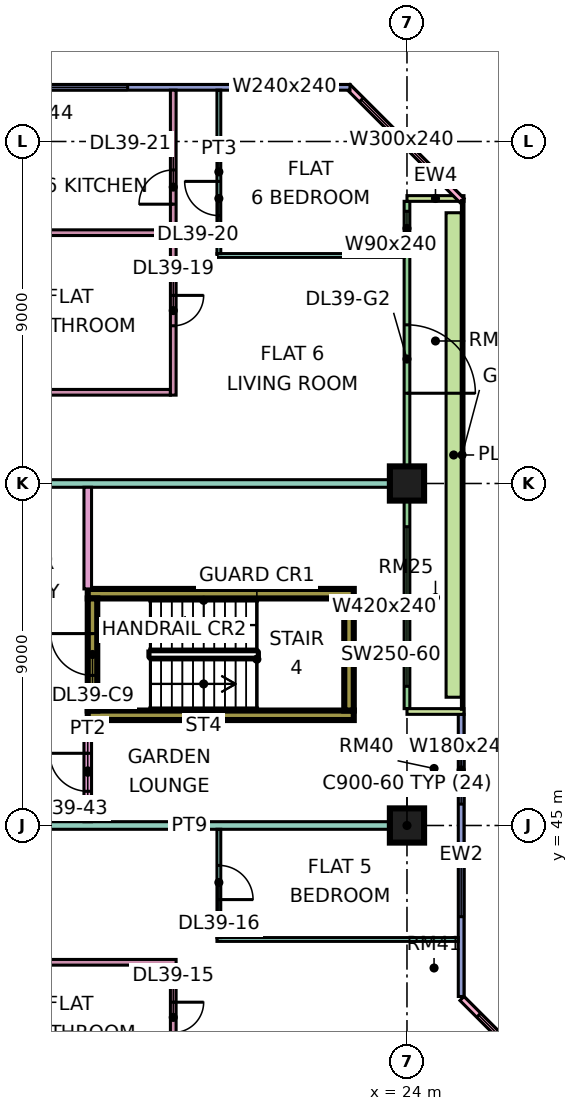
"""IFC4 building model, lengths in metres.
Left out: names, types, materials, properties, quantities, classifications, styles, units other than length and angle.
Written with IfcOpenShell. Run it as: python <this file> out.ifc"""

import sys

from ifc_helpers import new_model, si_unit, direction, frame, frame_2d, origin, origin_2d, place, context, subcontext, project, spatial, rectangle, extrude, element, fill, save


model = new_model("IFC4")
c1 = context("Model", 3, precision=1e-05, world=origin(), true_north=direction((0.0, 1.0)))
c2 = subcontext(c1, "Body", "Model", "MODEL_VIEW")
j1 = project(units=[si_unit("LENGTHUNIT", "METRE"), si_unit("PLANEANGLEUNIT", "RADIAN")], contexts=[c1])
p1 = place(None, origin())
s1 = spatial("IfcSite", under=j1, at=p1, CompositionType="ELEMENT")
p2 = place(p1, origin())
s2 = spatial("IfcBuilding", under=s1, at=p2, CompositionType="ELEMENT")
p3 = place(p2, frame((0.0, 0.0, 172.4)))
s3 = spatial("IfcBuildingStorey", under=s2, at=p3, CompositionType="ELEMENT", Elevation=172.4)
for number, where, z_axis, x_axis in (
    (1, (24.0, 45.0, 0.0), (0.0, 0.0, 1.0), (1.0, 0.0, 0.0)),
    (2, (24.0, 54.0, 0.0), (0.0, 0.0, 1.0), (1.0, 0.0, 0.0)),
):
    element("IfcColumn", number, at=place(p3, frame(where, z_axis=z_axis, x_axis=x_axis)), inside=s3, PredefinedType="COLUMN", context=c2, shape_type="SweptSolid", body=[
        extrude(rectangle(XDim=0.9, YDim=0.9, at=origin_2d()), origin(), (0.0, 0.0, 1.0), 3.75),
    ])
for number, where, z_axis, x_axis in (
    (3, (15.6, 47.9, 0.0), (0.0, 0.0, 1.0), (1.0, 0.0, 0.0)),
    (4, (15.6, 51.1, 0.0), (0.0, 0.0, 1.0), (1.0, 0.0, 0.0)),
):
    element("IfcWall", number, at=place(p3, frame(where, z_axis=z_axis, x_axis=x_axis)), inside=s3, PredefinedType="SHEAR", context=c2, shape_type="SweptSolid", body=[
        extrude(rectangle(XDim=7.0, YDim=0.25, at=frame_2d((3.5, 0.0))), origin(), (0.0, 0.0, 1.0), 3.75),
    ])
p4 = place(p3, frame((15.725, 48.025, 0.0), z_axis=(0.0, 0.0, 1.0), x_axis=(0.0, 1.0, 0.0)))
e5 = element("IfcWall", 5, at=p4, inside=s3, PredefinedType="SHEAR", context=c2, shape_type="SweptSolid", body=[
    extrude(rectangle(XDim=2.95, YDim=0.25, at=frame_2d((1.475, 0.0))), origin(), (0.0, 0.0, 1.0), 3.75),
])
p5 = place(p4, frame((0.925, 0.0, 0.0)))
e6 = element("IfcOpeningElement", 6, at=p5, cuts=e5, PredefinedType="OPENING", context=c2, shape_type="SweptSolid", body=[
    extrude(rectangle(XDim=1.1, YDim=2.2, at=frame_2d((0.55, 1.1))), frame((0.0, 0.135, 0.0), z_axis=(0.0, -1.0, 0.0), x_axis=(1.0, 0.0, 0.0)), (0.0, 0.0, 1.0), 0.27),
])
p6 = place(p3, frame((22.475, 48.025, 0.0), z_axis=(0.0, 0.0, 1.0), x_axis=(0.0, 1.0, 0.0)))
e7 = element("IfcWall", 7, at=p6, inside=s3, PredefinedType="SHEAR", context=c2, shape_type="SweptSolid", body=[
    extrude(rectangle(XDim=2.95, YDim=0.25, at=frame_2d((1.475, 0.0))), origin(), (0.0, 0.0, 1.0), 3.75),
])
p7 = place(p3, frame((28.447, 37.447, 0.0), z_axis=(0.0, 0.0, 1.0), x_axis=(-0.707106781187, 0.707106781187, 0.0)))
e8 = element("IfcWall", 8, at=p7, inside=s3, PredefinedType="SOLIDWALL", context=c2, shape_type="SweptSolid", body=[
    extrude(rectangle(XDim=4.243, YDim=0.15, at=frame_2d((2.121, 0.0))), origin(), (0.0, 0.0, 1.0), 3.35),
])
p8 = place(p7, frame((0.621, 0.0, 0.45)))
e9 = element("IfcOpeningElement", 9, at=p8, cuts=e8, PredefinedType="OPENING", context=c2, shape_type="SweptSolid", body=[
    extrude(rectangle(XDim=3.0, YDim=2.4, at=frame_2d((1.5, 1.2))), frame((0.0, 0.085, 0.0), z_axis=(0.0, -1.0, 0.0), x_axis=(1.0, 0.0, 0.0)), (0.0, 0.0, 1.0), 0.17),
])
p9 = place(p3, frame((25.425, 40.5, 0.0), z_axis=(0.0, 0.0, 1.0), x_axis=(0.0, 1.0, 0.0)))
e10 = element("IfcWall", 10, at=p9, inside=s3, PredefinedType="SOLIDWALL", context=c2, shape_type="SweptSolid", body=[
    extrude(rectangle(XDim=7.425, YDim=0.15, at=frame_2d((3.712, 0.0))), origin(), (0.0, 0.0, 1.0), 3.35),
])
p10 = place(p9, frame((2.1, 0.0, 0.45)))
e11 = element("IfcOpeningElement", 11, at=p10, cuts=e10, PredefinedType="OPENING", context=c2, shape_type="SweptSolid", body=[
    extrude(rectangle(XDim=1.8, YDim=2.4, at=frame_2d((0.9, 1.2))), frame((0.0, 0.085, 0.0), z_axis=(0.0, -1.0, 0.0), x_axis=(1.0, 0.0, 0.0)), (0.0, 0.0, 1.0), 0.17),
])
p11 = place(p9, frame((5.062, 0.0, 0.45)))
e12 = element("IfcOpeningElement", 12, at=p11, cuts=e10, PredefinedType="OPENING", context=c2, shape_type="SweptSolid", body=[
    extrude(rectangle(XDim=1.8, YDim=2.4, at=frame_2d((0.9, 1.2))), frame((0.0, 0.085, 0.0), z_axis=(0.0, -1.0, 0.0), x_axis=(1.0, 0.0, 0.0)), (0.0, 0.0, 1.0), 0.17),
])
p12 = place(p3, frame((24.0, 48.075, 0.0), z_axis=(0.0, 0.0, 1.0), x_axis=(0.0, 1.0, 0.0)))
e13 = element("IfcWall", 13, at=p12, inside=s3, PredefinedType="SOLIDWALL", context=c2, shape_type="SweptSolid", body=[
    extrude(rectangle(XDim=13.35, YDim=0.15, at=frame_2d((6.675, 0.0))), origin(), (0.0, 0.0, 1.0), 3.35),
])
p13 = place(p12, frame((0.587, 0.0, 0.45)))
e14 = element("IfcOpeningElement", 14, at=p13, cuts=e13, PredefinedType="OPENING", context=c2, shape_type="SweptSolid", body=[
    extrude(rectangle(XDim=4.2, YDim=2.4, at=frame_2d((2.1, 1.2))), frame((0.0, 0.085, 0.0), z_axis=(0.0, -1.0, 0.0), x_axis=(1.0, 0.0, 0.0)), (0.0, 0.0, 1.0), 0.17),
])
p14 = place(p12, frame((8.3, 0.0, 0.0)))
e15 = element("IfcOpeningElement", 15, at=p14, cuts=e13, PredefinedType="OPENING", context=c2, shape_type="SweptSolid", body=[
    extrude(rectangle(XDim=1.8, YDim=2.4, at=frame_2d((0.9, 1.2))), frame((0.0, 0.085, 0.0), z_axis=(0.0, -1.0, 0.0), x_axis=(1.0, 0.0, 0.0)), (0.0, 0.0, 1.0), 0.17),
])
p15 = place(p12, frame((12.188, 0.0, 0.45)))
e16 = element("IfcOpeningElement", 16, at=p15, cuts=e13, PredefinedType="OPENING", context=c2, shape_type="SweptSolid", body=[
    extrude(rectangle(XDim=0.9, YDim=2.4, at=frame_2d((0.45, 1.2))), frame((0.0, 0.085, 0.0), z_axis=(0.0, -1.0, 0.0), x_axis=(1.0, 0.0, 0.0)), (0.0, 0.0, 1.0), 0.17),
])
for number, where, z_axis, x_axis in (
    (17, (25.5, 48.0, 0.0), (0.0, 0.0, 1.0), (-1.0, 0.0, 0.0)),
    (18, (25.5, 61.5, 0.0), (0.0, 0.0, 1.0), (-1.0, 0.0, 0.0)),
):
    element("IfcWall", number, at=place(p3, frame(where, z_axis=z_axis, x_axis=x_axis)), inside=s3, PredefinedType="SOLIDWALL", context=c2, shape_type="SweptSolid", body=[
        extrude(rectangle(XDim=1.5, YDim=0.15, at=frame_2d((0.75, 0.0))), origin(), (0.0, 0.0, 1.0), 3.35),
    ])
p16 = place(p3, frame((25.447, 61.447, 0.0), z_axis=(0.0, 0.0, 1.0), x_axis=(-0.707106781187, 0.707106781187, 0.0)))
e19 = element("IfcWall", 19, at=p16, inside=s3, PredefinedType="SOLIDWALL", context=c2, shape_type="SweptSolid", body=[
    extrude(rectangle(XDim=4.243, YDim=0.15, at=frame_2d((2.121, 0.0))), origin(), (0.0, 0.0, 1.0), 3.35),
])
p17 = place(p16, frame((0.744, 0.0, 0.45)))
e20 = element("IfcOpeningElement", 20, at=p17, cuts=e19, PredefinedType="OPENING", context=c2, shape_type="SweptSolid", body=[
    extrude(rectangle(XDim=3.0, YDim=2.4, at=frame_2d((1.5, 1.2))), frame((0.0, 0.085, 0.0), z_axis=(0.0, -1.0, 0.0), x_axis=(1.0, 0.0, 0.0)), (0.0, 0.0, 1.0), 0.17),
])
p18 = place(p3, frame((22.5, 64.425, 0.0), z_axis=(0.0, 0.0, 1.0), x_axis=(-1.0, 0.0, 0.0)))
e21 = element("IfcWall", 21, at=p18, inside=s3, PredefinedType="SOLIDWALL", context=c2, shape_type="SweptSolid", body=[
    extrude(rectangle(XDim=10.425, YDim=0.15, at=frame_2d((5.212, 0.0))), origin(), (0.0, 0.0, 1.0), 3.35),
])
p19 = place(p18, frame((0.525, 0.0, 0.45)))
e22 = element("IfcOpeningElement", 22, at=p19, cuts=e21, PredefinedType="OPENING", context=c2, shape_type="SweptSolid", body=[
    extrude(rectangle(XDim=2.4, YDim=2.4, at=frame_2d((1.2, 1.2))), frame((0.0, 0.085, 0.0), z_axis=(0.0, -1.0, 0.0), x_axis=(1.0, 0.0, 0.0)), (0.0, 0.0, 1.0), 0.17),
])
p20 = place(p18, frame((5.85, 0.0, 0.45)))
e23 = element("IfcOpeningElement", 23, at=p20, cuts=e21, PredefinedType="OPENING", context=c2, shape_type="SweptSolid", body=[
    extrude(rectangle(XDim=3.0, YDim=2.4, at=frame_2d((1.5, 1.2))), frame((0.0, 0.085, 0.0), z_axis=(0.0, -1.0, 0.0), x_axis=(1.0, 0.0, 0.0)), (0.0, 0.0, 1.0), 0.17),
])
p21 = place(p3, frame((25.229, 48.375, 0.0), z_axis=(0.0, 0.0, 1.0), x_axis=(0.0, 1.0, 0.0)))
e24 = element("IfcWall", 24, at=p21, inside=s3, PredefinedType="SOLIDWALL", context=c2, shape_type="SweptSolid", body=[
    extrude(rectangle(XDim=12.75, YDim=0.4, at=frame_2d((6.375, 0.0))), origin(), (0.0, 0.0, 1.0), 0.7),
])
p22 = place(p3, frame((12.55, 41.4, 0.0), z_axis=(0.0, 0.0, 1.0), x_axis=(1.0, 0.0, 0.0)))
e25 = element("IfcWall", 25, at=p22, inside=s3, PredefinedType="PARTITIONING", context=c2, shape_type="SweptSolid", body=[
    extrude(rectangle(XDim=5.375, YDim=0.15, at=frame_2d((2.688, 0.0))), origin(), (0.0, 0.0, 1.0), 3.35),
])
p23 = place(p3, frame((12.55, 45.0, 0.0), z_axis=(0.0, 0.0, 1.0), x_axis=(1.0, 0.0, 0.0)))
e26 = element("IfcWall", 26, at=p23, inside=s3, PredefinedType="PARTITIONING", context=c2, shape_type="SweptSolid", body=[
    extrude(rectangle(XDim=11.45, YDim=0.2, at=frame_2d((5.725, 0.0))), origin(), (0.0, 0.0, 1.0), 3.35),
])
p24 = place(p3, frame((12.55, 54.0, 0.0), z_axis=(0.0, 0.0, 1.0), x_axis=(1.0, 0.0, 0.0)))
e27 = element("IfcWall", 27, at=p24, inside=s3, PredefinedType="PARTITIONING", context=c2, shape_type="SweptSolid", body=[
    extrude(rectangle(XDim=11.376, YDim=0.2, at=frame_2d((5.688, 0.0))), origin(), (0.0, 0.0, 1.0), 3.35),
])
for number, where, z_axis, x_axis in (
    (28, (12.55, 56.4, 0.0), (0.0, 0.0, 1.0), (1.0, 0.0, 0.0)),
    (29, (12.55, 60.6, 0.0), (0.0, 0.0, 1.0), (1.0, 0.0, 0.0)),
):
    element("IfcWall", number, at=place(p3, frame(where, z_axis=z_axis, x_axis=x_axis)), inside=s3, PredefinedType="PARTITIONING", context=c2, shape_type="SweptSolid", body=[
        extrude(rectangle(XDim=5.225, YDim=0.15, at=frame_2d((2.612, 0.0))), origin(), (0.0, 0.0, 1.0), 3.35),
    ])
p25 = place(p3, frame((15.6, 45.1, 0.0), z_axis=(0.0, 0.0, 1.0), x_axis=(0.0, 1.0, 0.0)))
e30 = element("IfcWall", 30, at=p25, inside=s3, PredefinedType="PARTITIONING", context=c2, shape_type="SweptSolid", body=[
    extrude(rectangle(XDim=2.675, YDim=0.2, at=frame_2d((1.337, 0.0))), origin(), (0.0, 0.0, 1.0), 3.35),
])
p26 = place(p25, frame((0.8, 0.0, 0.0)))
e31 = element("IfcOpeningElement", 31, at=p26, cuts=e30, PredefinedType="OPENING", context=c2, shape_type="SweptSolid", body=[
    extrude(rectangle(XDim=1.0, YDim=2.1, at=frame_2d((0.5, 1.05))), frame((0.0, 0.11, 0.0), z_axis=(0.0, -1.0, 0.0), x_axis=(1.0, 0.0, 0.0)), (0.0, 0.0, 1.0), 0.22),
])
p27 = place(p3, frame((15.6, 51.225, 0.0), z_axis=(0.0, 0.0, 1.0), x_axis=(0.0, 1.0, 0.0)))
e32 = element("IfcWall", 32, at=p27, inside=s3, PredefinedType="PARTITIONING", context=c2, shape_type="SweptSolid", body=[
    extrude(rectangle(XDim=2.675, YDim=0.2, at=frame_2d((1.337, 0.0))), origin(), (0.0, 0.0, 1.0), 3.35),
])
p28 = place(p3, frame((17.85, 36.1, 0.0), z_axis=(0.0, 0.0, 1.0), x_axis=(0.0, 1.0, 0.0)))
e33 = element("IfcWall", 33, at=p28, inside=s3, PredefinedType="PARTITIONING", context=c2, shape_type="SweptSolid", body=[
    extrude(rectangle(XDim=5.225, YDim=0.15, at=frame_2d((2.612, 0.0))), origin(), (0.0, 0.0, 1.0), 3.35),
])
p29 = place(p28, frame((3.45, 0.0, 0.0)))
e34 = element("IfcOpeningElement", 34, at=p29, cuts=e33, PredefinedType="OPENING", context=c2, shape_type="SweptSolid", body=[
    extrude(rectangle(XDim=0.8, YDim=2.1, at=frame_2d((0.4, 1.05))), frame((0.0, 0.085, 0.0), z_axis=(0.0, -1.0, 0.0), x_axis=(1.0, 0.0, 0.0)), (0.0, 0.0, 1.0), 0.17),
])
p30 = place(p28, frame((0.65, 0.0, 0.0)))
e35 = element("IfcOpeningElement", 35, at=p30, cuts=e33, PredefinedType="OPENING", context=c2, shape_type="SweptSolid", body=[
    extrude(rectangle(XDim=0.9, YDim=2.1, at=frame_2d((0.45, 1.05))), frame((0.0, 0.085, 0.0), z_axis=(0.0, -1.0, 0.0), x_axis=(1.0, 0.0, 0.0)), (0.0, 0.0, 1.0), 0.17),
])
p31 = place(p3, frame((17.85, 56.325, 0.0), z_axis=(0.0, 0.0, 1.0), x_axis=(0.0, 1.0, 0.0)))
e36 = element("IfcWall", 36, at=p31, inside=s3, PredefinedType="PARTITIONING", context=c2, shape_type="SweptSolid", body=[
    extrude(rectangle(XDim=8.025, YDim=0.15, at=frame_2d((4.013, 0.0))), origin(), (0.0, 0.0, 1.0), 3.35),
])
p32 = place(p31, frame((1.825, 0.0, 0.0)))
e37 = element("IfcOpeningElement", 37, at=p32, cuts=e36, PredefinedType="OPENING", context=c2, shape_type="SweptSolid", body=[
    extrude(rectangle(XDim=0.8, YDim=2.1, at=frame_2d((0.4, 1.05))), frame((0.0, 0.085, 0.0), z_axis=(0.0, -1.0, 0.0), x_axis=(1.0, 0.0, 0.0)), (0.0, 0.0, 1.0), 0.17),
])
p33 = place(p31, frame((5.025, 0.0, 0.0)))
e38 = element("IfcOpeningElement", 38, at=p33, cuts=e36, PredefinedType="OPENING", context=c2, shape_type="SweptSolid", body=[
    extrude(rectangle(XDim=0.9, YDim=2.1, at=frame_2d((0.45, 1.05))), frame((0.0, 0.085, 0.0), z_axis=(0.0, -1.0, 0.0), x_axis=(1.0, 0.0, 0.0)), (0.0, 0.0, 1.0), 0.17),
])
p34 = place(p3, frame((19.0, 42.0, 0.0), z_axis=(0.0, 0.0, 1.0), x_axis=(1.0, 0.0, 0.0)))
e39 = element("IfcWall", 39, at=p34, inside=s3, PredefinedType="PARTITIONING", context=c2, shape_type="SweptSolid", body=[
    extrude(rectangle(XDim=6.35, YDim=0.1, at=frame_2d((3.175, 0.0))), origin(), (0.0, 0.0, 1.0), 3.35),
])
p35 = place(p3, frame((19.0, 60.0, 0.0), z_axis=(0.0, 0.0, 1.0), x_axis=(1.0, 0.0, 0.0)))
e40 = element("IfcWall", 40, at=p35, inside=s3, PredefinedType="PARTITIONING", context=c2, shape_type="SweptSolid", body=[
    extrude(rectangle(XDim=4.926, YDim=0.1, at=frame_2d((2.463, 0.0))), origin(), (0.0, 0.0, 1.0), 3.35),
])
p36 = place(p3, frame((19.05, 42.05, 0.0), z_axis=(0.0, 0.0, 1.0), x_axis=(0.0, 1.0, 0.0)))
e41 = element("IfcWall", 41, at=p36, inside=s3, PredefinedType="PARTITIONING", context=c2, shape_type="SweptSolid", body=[
    extrude(rectangle(XDim=2.85, YDim=0.1, at=frame_2d((1.425, 0.0))), origin(), (0.0, 0.0, 1.0), 3.35),
])
p37 = place(p36, frame((1.0, 0.0, 0.0)))
e42 = element("IfcOpeningElement", 42, at=p37, cuts=e41, PredefinedType="OPENING", context=c2, shape_type="SweptSolid", body=[
    extrude(rectangle(XDim=0.9, YDim=2.1, at=frame_2d((0.45, 1.05))), frame((0.0, 0.06, 0.0), z_axis=(0.0, -1.0, 0.0), x_axis=(1.0, 0.0, 0.0)), (0.0, 0.0, 1.0), 0.12),
])
p38 = place(p3, frame((19.05, 60.05, 0.0), z_axis=(0.0, 0.0, 1.0), x_axis=(0.0, 1.0, 0.0)))
e43 = element("IfcWall", 43, at=p38, inside=s3, PredefinedType="PARTITIONING", context=c2, shape_type="SweptSolid", body=[
    extrude(rectangle(XDim=4.301, YDim=0.1, at=frame_2d((2.15, 0.0))), origin(), (0.0, 0.0, 1.0), 3.35),
])
p39 = place(p38, frame((1.0, 0.0, 0.0)))
e44 = element("IfcOpeningElement", 44, at=p39, cuts=e43, PredefinedType="OPENING", context=c2, shape_type="SweptSolid", body=[
    extrude(rectangle(XDim=0.9, YDim=2.1, at=frame_2d((0.45, 1.05))), frame((0.0, 0.06, 0.0), z_axis=(0.0, -1.0, 0.0), x_axis=(1.0, 0.0, 0.0)), (0.0, 0.0, 1.0), 0.12),
])
p40 = place(p8, origin())
e45 = element("IfcWindow", 45, at=p40, inside=s3, PartitioningType="SINGLE_PANEL", PredefinedType="WINDOW", context=c2, shape_type="SweptSolid", body=[
    extrude(rectangle(XDim=3.0, YDim=2.4, at=frame_2d((1.5, 1.2))), frame((0.0, 0.03, 0.0), z_axis=(0.0, -1.0, 0.0), x_axis=(1.0, 0.0, 0.0)), (0.0, 0.0, 1.0), 0.06),
])
fill(e9, e45)
p41 = place(p10, origin())
e46 = element("IfcWindow", 46, at=p41, inside=s3, PartitioningType="SINGLE_PANEL", PredefinedType="WINDOW", context=c2, shape_type="SweptSolid", body=[
    extrude(rectangle(XDim=1.8, YDim=2.4, at=frame_2d((0.9, 1.2))), frame((0.0, 0.03, 0.0), z_axis=(0.0, -1.0, 0.0), x_axis=(1.0, 0.0, 0.0)), (0.0, 0.0, 1.0), 0.06),
])
fill(e11, e46)
p42 = place(p11, origin())
e47 = element("IfcWindow", 47, at=p42, inside=s3, PartitioningType="SINGLE_PANEL", PredefinedType="WINDOW", context=c2, shape_type="SweptSolid", body=[
    extrude(rectangle(XDim=1.8, YDim=2.4, at=frame_2d((0.9, 1.2))), frame((0.0, 0.03, 0.0), z_axis=(0.0, -1.0, 0.0), x_axis=(1.0, 0.0, 0.0)), (0.0, 0.0, 1.0), 0.06),
])
fill(e12, e47)
p43 = place(p13, origin())
e48 = element("IfcWindow", 48, at=p43, inside=s3, PartitioningType="SINGLE_PANEL", PredefinedType="WINDOW", context=c2, shape_type="SweptSolid", body=[
    extrude(rectangle(XDim=4.2, YDim=2.4, at=frame_2d((2.1, 1.2))), frame((0.0, 0.03, 0.0), z_axis=(0.0, -1.0, 0.0), x_axis=(1.0, 0.0, 0.0)), (0.0, 0.0, 1.0), 0.06),
])
fill(e14, e48)
p44 = place(p14, frame((1.8, 0.0, 0.0), z_axis=(0.0, 0.0, 1.0), x_axis=(-1.0, 0.0, 0.0)))
e49 = element("IfcDoor", 49, at=p44, inside=s3, OperationType="DOUBLE_DOOR_SINGLE_SWING", PredefinedType="DOOR", context=c2, shape_type="SweptSolid", body=[
    extrude(rectangle(XDim=1.8, YDim=2.4, at=frame_2d((0.9, 1.2))), frame((0.0, 0.025, 0.0), z_axis=(0.0, -1.0, 0.0), x_axis=(1.0, 0.0, 0.0)), (0.0, 0.0, 1.0), 0.05),
])
fill(e15, e49)
p45 = place(p15, origin())
e50 = element("IfcWindow", 50, at=p45, inside=s3, PartitioningType="SINGLE_PANEL", PredefinedType="WINDOW", context=c2, shape_type="SweptSolid", body=[
    extrude(rectangle(XDim=0.9, YDim=2.4, at=frame_2d((0.45, 1.2))), frame((0.0, 0.03, 0.0), z_axis=(0.0, -1.0, 0.0), x_axis=(1.0, 0.0, 0.0)), (0.0, 0.0, 1.0), 0.06),
])
fill(e16, e50)
p46 = place(p17, origin())
e51 = element("IfcWindow", 51, at=p46, inside=s3, PartitioningType="SINGLE_PANEL", PredefinedType="WINDOW", context=c2, shape_type="SweptSolid", body=[
    extrude(rectangle(XDim=3.0, YDim=2.4, at=frame_2d((1.5, 1.2))), frame((0.0, 0.03, 0.0), z_axis=(0.0, -1.0, 0.0), x_axis=(1.0, 0.0, 0.0)), (0.0, 0.0, 1.0), 0.06),
])
fill(e20, e51)
p47 = place(p19, origin())
e52 = element("IfcWindow", 52, at=p47, inside=s3, PartitioningType="SINGLE_PANEL", PredefinedType="WINDOW", context=c2, shape_type="SweptSolid", body=[
    extrude(rectangle(XDim=2.4, YDim=2.4, at=frame_2d((1.2, 1.2))), frame((0.0, 0.03, 0.0), z_axis=(0.0, -1.0, 0.0), x_axis=(1.0, 0.0, 0.0)), (0.0, 0.0, 1.0), 0.06),
])
fill(e22, e52)
p48 = place(p20, origin())
e53 = element("IfcWindow", 53, at=p48, inside=s3, PartitioningType="SINGLE_PANEL", PredefinedType="WINDOW", context=c2, shape_type="SweptSolid", body=[
    extrude(rectangle(XDim=3.0, YDim=2.4, at=frame_2d((1.5, 1.2))), frame((0.0, 0.03, 0.0), z_axis=(0.0, -1.0, 0.0), x_axis=(1.0, 0.0, 0.0)), (0.0, 0.0, 1.0), 0.06),
])
fill(e23, e53)
p49 = place(p5, frame((1.1, 0.0, 0.0), z_axis=(0.0, 0.0, 1.0), x_axis=(-1.0, 0.0, 0.0)))
e54 = element("IfcDoor", 54, at=p49, inside=s3, OperationType="SINGLE_SWING_RIGHT", PredefinedType="DOOR", context=c2, shape_type="SweptSolid", body=[
    extrude(rectangle(XDim=1.1, YDim=2.2, at=frame_2d((0.55, 1.1))), frame((0.0, 0.025, 0.0), z_axis=(0.0, -1.0, 0.0), x_axis=(1.0, 0.0, 0.0)), (0.0, 0.0, 1.0), 0.05),
])
fill(e6, e54)
p50 = place(p29, origin())
e55 = element("IfcDoor", 55, at=p50, inside=s3, OperationType="SINGLE_SWING_RIGHT", PredefinedType="DOOR", context=c2, shape_type="SweptSolid", body=[
    extrude(rectangle(XDim=0.8, YDim=2.1, at=frame_2d((0.4, 1.05))), frame((0.0, 0.025, 0.0), z_axis=(0.0, -1.0, 0.0), x_axis=(1.0, 0.0, 0.0)), (0.0, 0.0, 1.0), 0.05),
])
fill(e34, e55)
p51 = place(p37, frame((0.9, 0.0, 0.0), z_axis=(0.0, 0.0, 1.0), x_axis=(-1.0, 0.0, 0.0)))
e56 = element("IfcDoor", 56, at=p51, inside=s3, OperationType="SINGLE_SWING_LEFT", PredefinedType="DOOR", context=c2, shape_type="SweptSolid", body=[
    extrude(rectangle(XDim=0.9, YDim=2.1, at=frame_2d((0.45, 1.05))), frame((0.0, 0.025, 0.0), z_axis=(0.0, -1.0, 0.0), x_axis=(1.0, 0.0, 0.0)), (0.0, 0.0, 1.0), 0.05),
])
fill(e42, e56)
p52 = place(p32, origin())
e57 = element("IfcDoor", 57, at=p52, inside=s3, OperationType="SINGLE_SWING_RIGHT", PredefinedType="DOOR", context=c2, shape_type="SweptSolid", body=[
    extrude(rectangle(XDim=0.8, YDim=2.1, at=frame_2d((0.4, 1.05))), frame((0.0, 0.025, 0.0), z_axis=(0.0, -1.0, 0.0), x_axis=(1.0, 0.0, 0.0)), (0.0, 0.0, 1.0), 0.05),
])
fill(e37, e57)
p53 = place(p39, frame((0.9, 0.0, 0.0), z_axis=(0.0, 0.0, 1.0), x_axis=(-1.0, 0.0, 0.0)))
e58 = element("IfcDoor", 58, at=p53, inside=s3, OperationType="SINGLE_SWING_RIGHT", PredefinedType="DOOR", context=c2, shape_type="SweptSolid", body=[
    extrude(rectangle(XDim=0.9, YDim=2.1, at=frame_2d((0.45, 1.05))), frame((0.0, 0.025, 0.0), z_axis=(0.0, -1.0, 0.0), x_axis=(1.0, 0.0, 0.0)), (0.0, 0.0, 1.0), 0.05),
])
fill(e44, e58)
p54 = place(p33, origin())
e59 = element("IfcDoor", 59, at=p54, inside=s3, OperationType="SINGLE_SWING_LEFT", PredefinedType="DOOR", context=c2, shape_type="SweptSolid", body=[
    extrude(rectangle(XDim=0.9, YDim=2.1, at=frame_2d((0.45, 1.05))), frame((0.0, 0.025, 0.0), z_axis=(0.0, -1.0, 0.0), x_axis=(1.0, 0.0, 0.0)), (0.0, 0.0, 1.0), 0.05),
])
fill(e38, e59)
p55 = place(p26, frame((1.0, 0.0, 0.0), z_axis=(0.0, 0.0, 1.0), x_axis=(-1.0, 0.0, 0.0)))
e60 = element("IfcDoor", 60, at=p55, inside=s3, OperationType="SINGLE_SWING_RIGHT", PredefinedType="DOOR", context=c2, shape_type="SweptSolid", body=[
    extrude(rectangle(XDim=1.0, YDim=2.1, at=frame_2d((0.5, 1.05))), frame((0.0, 0.025, 0.0), z_axis=(0.0, -1.0, 0.0), x_axis=(1.0, 0.0, 0.0)), (0.0, 0.0, 1.0), 0.05),
])
fill(e31, e60)
save(model, sys.argv[1])
